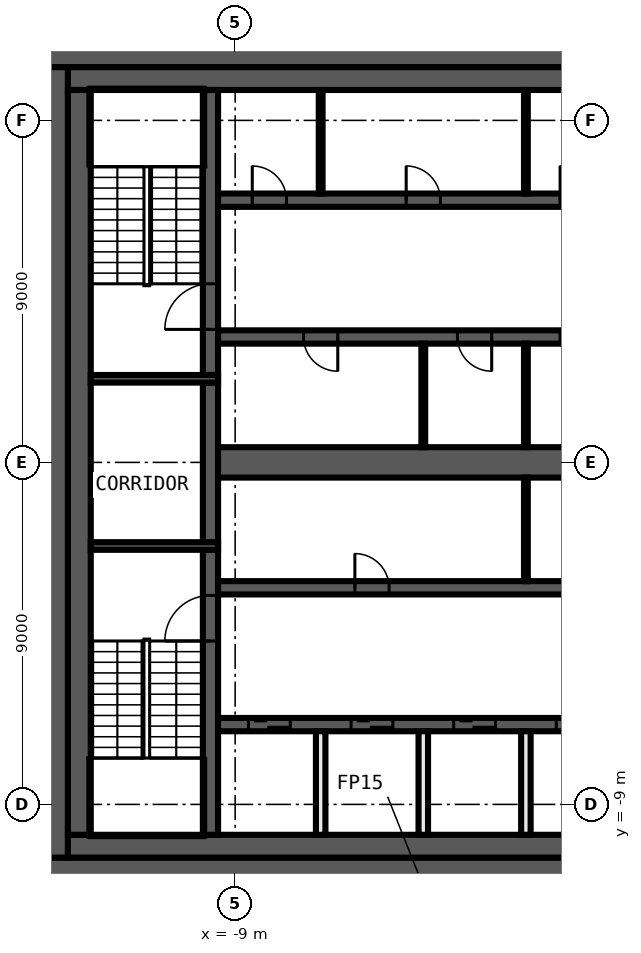
"""IFC4 building model, lengths in metres.
Left out: names, types, materials, properties, quantities, classifications, styles, units other than length and angle.
Written with IfcOpenShell. Run it as: python <this file> out.ifc"""

import sys

from ifc_helpers import new_model, si_unit, direction, frame, frame_2d, origin, place, context, subcontext, project, spatial, rectangle, extrude, element, fill, save


model = new_model("IFC4")
c1 = context("Model", 3, precision=1e-05, world=origin(), true_north=direction((0.0, 1.0)))
c2 = subcontext(c1, "Body", "Model", "MODEL_VIEW")
j1 = project(units=[si_unit("LENGTHUNIT", "METRE"), si_unit("PLANEANGLEUNIT", "RADIAN")], contexts=[c1])
p1 = place(None, origin())
s1 = spatial("IfcSite", under=j1, at=p1, CompositionType="ELEMENT")
p2 = place(p1, origin())
s2 = spatial("IfcBuilding", under=s1, at=p2, CompositionType="ELEMENT")
p3 = place(p2, frame((0.0, 0.0, 306.8)))
s3 = spatial("IfcBuildingStorey", under=s2, at=p3, CompositionType="ELEMENT", Elevation=306.8)
p4 = place(p3, frame((-14.0, 10.7, 0.0), z_axis=(0.0, 0.0, 1.0), x_axis=(1.0, 0.0, 0.0)))
e1 = element("IfcWall", 1, at=p4, inside=s3, PredefinedType="SHEAR", context=c2, shape_type="SweptSolid", body=[
    extrude(rectangle(XDim=28.0, YDim=0.6, at=frame_2d((14.0, 0.0))), origin(), (0.0, 0.0, 1.0), 3.82),
])
p5 = place(p4, frame((15.9, 0.0, 0.0)))
e2 = element("IfcOpeningElement", 2, at=p5, cuts=e1, PredefinedType="OPENING", context=c2, shape_type="SweptSolid", body=[
    extrude(rectangle(XDim=1.6, YDim=2.1, at=frame_2d((0.8, 1.05))), frame((0.0, 0.31, 0.0), z_axis=(0.0, -1.0, 0.0), x_axis=(1.0, 0.0, 0.0)), (0.0, 0.0, 1.0), 0.62),
])
p6 = place(p3, frame((14.0, -10.7, 0.0), z_axis=(0.0, 0.0, 1.0), x_axis=(-1.0, 0.0, 0.0)))
e3 = element("IfcWall", 3, at=p6, inside=s3, PredefinedType="SHEAR", context=c2, shape_type="SweptSolid", body=[
    extrude(rectangle(XDim=28.0, YDim=0.6, at=frame_2d((14.0, 0.0))), origin(), (0.0, 0.0, 1.0), 3.82),
])
p7 = place(p6, frame((5.1, 0.0, 0.0)))
e4 = element("IfcOpeningElement", 4, at=p7, cuts=e3, PredefinedType="OPENING", context=c2, shape_type="SweptSolid", body=[
    extrude(rectangle(XDim=1.6, YDim=2.1, at=frame_2d((0.8, 1.05))), frame((0.0, 0.31, 0.0), z_axis=(0.0, -1.0, 0.0), x_axis=(1.0, 0.0, 0.0)), (0.0, 0.0, 1.0), 0.62),
])
p8 = place(p3, frame((-13.7, -10.4, 0.0), z_axis=(0.0, 0.0, 1.0), x_axis=(0.0, 1.0, 0.0)))
e5 = element("IfcWall", 5, at=p8, inside=s3, PredefinedType="SHEAR", context=c2, shape_type="SweptSolid", body=[
    extrude(rectangle(XDim=20.8, YDim=0.6, at=frame_2d((10.4, 0.0))), origin(), (0.0, 0.0, 1.0), 3.82),
])
p9 = place(p3, frame((-13.4, 10.1, 0.0), z_axis=(0.0, 0.0, 1.0), x_axis=(1.0, 0.0, 0.0)))
e6 = element("IfcWall", 6, at=p9, inside=s3, PredefinedType="SHEAR", context=c2, shape_type="SweptSolid", body=[
    extrude(rectangle(XDim=14.9, YDim=0.6, at=frame_2d((7.45, 0.0))), origin(), (0.0, 0.0, 1.0), 3.82),
])
p10 = place(p3, frame((6.9, -10.1, 0.0), z_axis=(0.0, 0.0, 1.0), x_axis=(-1.0, 0.0, 0.0)))
e7 = element("IfcWall", 7, at=p10, inside=s3, PredefinedType="SHEAR", context=c2, shape_type="SweptSolid", body=[
    extrude(rectangle(XDim=20.3, YDim=0.6, at=frame_2d((10.15, 0.0))), origin(), (0.0, 0.0, 1.0), 3.82),
])
p11 = place(p3, frame((-13.1, -9.8, 0.0), z_axis=(0.0, 0.0, 1.0), x_axis=(0.0, 1.0, 0.0)))
e8 = element("IfcWall", 8, at=p11, inside=s3, PredefinedType="SHEAR", context=c2, shape_type="SweptSolid", body=[
    extrude(rectangle(XDim=19.6, YDim=0.6, at=frame_2d((9.8, 0.0))), origin(), (0.0, 0.0, 1.0), 3.82),
])
p12 = place(p3, frame((-9.65, -9.8, 0.0), z_axis=(0.0, 0.0, 1.0), x_axis=(0.0, 1.0, 0.0)))
e9 = element("IfcWall", 9, at=p12, inside=s3, PredefinedType="SHEAR", context=c2, shape_type="SweptSolid", body=[
    extrude(rectangle(XDim=7.5, YDim=0.4, at=frame_2d((3.75, 0.0))), origin(), (0.0, 0.0, 1.0), 3.82),
])
p13 = place(p12, frame((5.1, 0.0, 0.0)))
e10 = element("IfcOpeningElement", 10, at=p13, cuts=e9, PredefinedType="OPENING", context=c2, shape_type="SweptSolid", body=[
    extrude(rectangle(XDim=1.2, YDim=2.1, at=frame_2d((0.6, 1.05))), frame((0.0, 0.21, 0.0), z_axis=(0.0, -1.0, 0.0), x_axis=(1.0, 0.0, 0.0)), (0.0, 0.0, 1.0), 0.42),
])
p14 = place(p3, frame((-9.65, -2.1, 0.0), z_axis=(0.0, 0.0, 1.0), x_axis=(0.0, 1.0, 0.0)))
e11 = element("IfcWall", 11, at=p14, inside=s3, PredefinedType="SHEAR", context=c2, shape_type="SweptSolid", body=[
    extrude(rectangle(XDim=4.2, YDim=0.4, at=frame_2d((2.1, 0.0))), origin(), (0.0, 0.0, 1.0), 3.82),
])
p15 = place(p3, frame((-9.65, 2.3, 0.0), z_axis=(0.0, 0.0, 1.0), x_axis=(0.0, 1.0, 0.0)))
e12 = element("IfcWall", 12, at=p15, inside=s3, PredefinedType="SHEAR", context=c2, shape_type="SweptSolid", body=[
    extrude(rectangle(XDim=7.5, YDim=0.4, at=frame_2d((3.75, 0.0))), origin(), (0.0, 0.0, 1.0), 3.82),
])
p16 = place(p15, frame((1.2, 0.0, 0.0)))
e13 = element("IfcOpeningElement", 13, at=p16, cuts=e12, PredefinedType="OPENING", context=c2, shape_type="SweptSolid", body=[
    extrude(rectangle(XDim=1.2, YDim=2.1, at=frame_2d((0.6, 1.05))), frame((0.0, 0.21, 0.0), z_axis=(0.0, -1.0, 0.0), x_axis=(1.0, 0.0, 0.0)), (0.0, 0.0, 1.0), 0.42),
])
for number, where, z_axis, x_axis in (
    (14, (-9.45, 2.2, 0.0), (0.0, 0.0, 1.0), (-1.0, 0.0, 0.0)),
    (15, (-9.45, -2.2, 0.0), (0.0, 0.0, 1.0), (-1.0, 0.0, 0.0)),
):
    element("IfcWall", number, at=place(p3, frame(where, z_axis=z_axis, x_axis=x_axis)), inside=s3, PredefinedType="SHEAR", context=c2, shape_type="SweptSolid", body=[
        extrude(rectangle(XDim=3.35, YDim=0.2, at=frame_2d((1.675, 0.0))), origin(), (0.0, 0.0, 1.0), 3.82),
    ])
p17 = place(p3, frame((-9.45, 6.9, 0.0), z_axis=(0.0, 0.0, 1.0), x_axis=(1.0, 0.0, 0.0)))
e16 = element("IfcWall", 16, at=p17, inside=s3, PredefinedType="SHEAR", context=c2, shape_type="SweptSolid", body=[
    extrude(rectangle(XDim=18.9, YDim=0.35, at=frame_2d((9.45, 0.0))), origin(), (0.0, 0.0, 1.0), 3.82),
])
p18 = place(p17, frame((11.55, 0.0, 0.0)))
e17 = element("IfcOpeningElement", 17, at=p18, cuts=e16, PredefinedType="OPENING", context=c2, shape_type="SweptSolid", body=[
    extrude(rectangle(XDim=1.2, YDim=2.1, at=frame_2d((0.6, 1.05))), frame((0.0, 0.185, 0.0), z_axis=(0.0, -1.0, 0.0), x_axis=(1.0, 0.0, 0.0)), (0.0, 0.0, 1.0), 0.37),
])
p19 = place(p17, frame((14.3, 0.0, 0.0)))
e18 = element("IfcOpeningElement", 18, at=p19, cuts=e16, PredefinedType="OPENING", context=c2, shape_type="SweptSolid", body=[
    extrude(rectangle(XDim=1.1, YDim=2.1, at=frame_2d((0.55, 1.05))), frame((0.0, 0.185, 0.0), z_axis=(0.0, -1.0, 0.0), x_axis=(1.0, 0.0, 0.0)), (0.0, 0.0, 1.0), 0.37),
])
p20 = place(p17, frame((17.0, 0.0, 0.0)))
e19 = element("IfcOpeningElement", 19, at=p20, cuts=e16, PredefinedType="OPENING", context=c2, shape_type="SweptSolid", body=[
    extrude(rectangle(XDim=1.1, YDim=2.1, at=frame_2d((0.55, 1.05))), frame((0.0, 0.185, 0.0), z_axis=(0.0, -1.0, 0.0), x_axis=(1.0, 0.0, 0.0)), (0.0, 0.0, 1.0), 0.37),
])
p21 = place(p17, frame((0.9, 0.0, 0.0)))
e20 = element("IfcOpeningElement", 20, at=p21, cuts=e16, PredefinedType="OPENING", context=c2, shape_type="SweptSolid", body=[
    extrude(rectangle(XDim=0.9, YDim=2.1, at=frame_2d((0.45, 1.05))), frame((0.0, 0.185, 0.0), z_axis=(0.0, -1.0, 0.0), x_axis=(1.0, 0.0, 0.0)), (0.0, 0.0, 1.0), 0.37),
])
p22 = place(p17, frame((4.95, 0.0, 0.0)))
e21 = element("IfcOpeningElement", 21, at=p22, cuts=e16, PredefinedType="OPENING", context=c2, shape_type="SweptSolid", body=[
    extrude(rectangle(XDim=0.9, YDim=2.1, at=frame_2d((0.45, 1.05))), frame((0.0, 0.185, 0.0), z_axis=(0.0, -1.0, 0.0), x_axis=(1.0, 0.0, 0.0)), (0.0, 0.0, 1.0), 0.37),
])
p23 = place(p17, frame((9.0, 0.0, 0.0)))
e22 = element("IfcOpeningElement", 22, at=p23, cuts=e16, PredefinedType="OPENING", context=c2, shape_type="SweptSolid", body=[
    extrude(rectangle(XDim=0.9, YDim=2.1, at=frame_2d((0.45, 1.05))), frame((0.0, 0.185, 0.0), z_axis=(0.0, -1.0, 0.0), x_axis=(1.0, 0.0, 0.0)), (0.0, 0.0, 1.0), 0.37),
])
p24 = place(p3, frame((9.45, 3.3, 0.0), z_axis=(0.0, 0.0, 1.0), x_axis=(-1.0, 0.0, 0.0)))
e23 = element("IfcWall", 23, at=p24, inside=s3, PredefinedType="SHEAR", context=c2, shape_type="SweptSolid", body=[
    extrude(rectangle(XDim=18.9, YDim=0.35, at=frame_2d((9.45, 0.0))), origin(), (0.0, 0.0, 1.0), 3.82),
])
p25 = place(p24, frame((6.2, 0.0, 0.0)))
e24 = element("IfcOpeningElement", 24, at=p25, cuts=e23, PredefinedType="OPENING", context=c2, shape_type="SweptSolid", body=[
    extrude(rectangle(XDim=1.1, YDim=2.1, at=frame_2d((0.55, 1.05))), frame((0.0, 0.185, 0.0), z_axis=(0.0, -1.0, 0.0), x_axis=(1.0, 0.0, 0.0)), (0.0, 0.0, 1.0), 0.37),
])
p26 = place(p24, frame((3.5, 0.0, 0.0)))
e25 = element("IfcOpeningElement", 25, at=p26, cuts=e23, PredefinedType="OPENING", context=c2, shape_type="SweptSolid", body=[
    extrude(rectangle(XDim=1.1, YDim=2.1, at=frame_2d((0.55, 1.05))), frame((0.0, 0.185, 0.0), z_axis=(0.0, -1.0, 0.0), x_axis=(1.0, 0.0, 0.0)), (0.0, 0.0, 1.0), 0.37),
])
p27 = place(p24, frame((0.9, 0.0, 0.0)))
e26 = element("IfcOpeningElement", 26, at=p27, cuts=e23, PredefinedType="OPENING", context=c2, shape_type="SweptSolid", body=[
    extrude(rectangle(XDim=0.9, YDim=2.1, at=frame_2d((0.45, 1.05))), frame((0.0, 0.185, 0.0), z_axis=(0.0, -1.0, 0.0), x_axis=(1.0, 0.0, 0.0)), (0.0, 0.0, 1.0), 0.37),
])
p28 = place(p24, frame((15.75, 0.0, 0.0)))
e27 = element("IfcOpeningElement", 27, at=p28, cuts=e23, PredefinedType="OPENING", context=c2, shape_type="SweptSolid", body=[
    extrude(rectangle(XDim=0.9, YDim=2.1, at=frame_2d((0.45, 1.05))), frame((0.0, 0.185, 0.0), z_axis=(0.0, -1.0, 0.0), x_axis=(1.0, 0.0, 0.0)), (0.0, 0.0, 1.0), 0.37),
])
p29 = place(p24, frame((11.7, 0.0, 0.0)))
e28 = element("IfcOpeningElement", 28, at=p29, cuts=e23, PredefinedType="OPENING", context=c2, shape_type="SweptSolid", body=[
    extrude(rectangle(XDim=0.9, YDim=2.1, at=frame_2d((0.45, 1.05))), frame((0.0, 0.185, 0.0), z_axis=(0.0, -1.0, 0.0), x_axis=(1.0, 0.0, 0.0)), (0.0, 0.0, 1.0), 0.37),
])
p30 = place(p24, frame((9.0, 0.0, 0.0)))
e29 = element("IfcOpeningElement", 29, at=p30, cuts=e23, PredefinedType="OPENING", context=c2, shape_type="SweptSolid", body=[
    extrude(rectangle(XDim=0.9, YDim=2.1, at=frame_2d((0.45, 1.05))), frame((0.0, 0.185, 0.0), z_axis=(0.0, -1.0, 0.0), x_axis=(1.0, 0.0, 0.0)), (0.0, 0.0, 1.0), 0.37),
])
p31 = place(p3, frame((-9.45, -3.3, 0.0), z_axis=(0.0, 0.0, 1.0), x_axis=(1.0, 0.0, 0.0)))
e30 = element("IfcWall", 30, at=p31, inside=s3, PredefinedType="SHEAR", context=c2, shape_type="SweptSolid", body=[
    extrude(rectangle(XDim=18.9, YDim=0.35, at=frame_2d((9.45, 0.0))), origin(), (0.0, 0.0, 1.0), 3.82),
])
p32 = place(p31, frame((17.0, 0.0, 0.0)))
e31 = element("IfcOpeningElement", 31, at=p32, cuts=e30, PredefinedType="OPENING", context=c2, shape_type="SweptSolid", body=[
    extrude(rectangle(XDim=1.1, YDim=2.1, at=frame_2d((0.55, 1.05))), frame((0.0, 0.185, 0.0), z_axis=(0.0, -1.0, 0.0), x_axis=(1.0, 0.0, 0.0)), (0.0, 0.0, 1.0), 0.37),
])
p33 = place(p31, frame((3.6, 0.0, 0.0)))
e32 = element("IfcOpeningElement", 32, at=p33, cuts=e30, PredefinedType="OPENING", context=c2, shape_type="SweptSolid", body=[
    extrude(rectangle(XDim=0.9, YDim=2.1, at=frame_2d((0.45, 1.05))), frame((0.0, 0.185, 0.0), z_axis=(0.0, -1.0, 0.0), x_axis=(1.0, 0.0, 0.0)), (0.0, 0.0, 1.0), 0.37),
])
p34 = place(p31, frame((10.35, 0.0, 0.0)))
e33 = element("IfcOpeningElement", 33, at=p34, cuts=e30, PredefinedType="OPENING", context=c2, shape_type="SweptSolid", body=[
    extrude(rectangle(XDim=0.9, YDim=2.1, at=frame_2d((0.45, 1.05))), frame((0.0, 0.185, 0.0), z_axis=(0.0, -1.0, 0.0), x_axis=(1.0, 0.0, 0.0)), (0.0, 0.0, 1.0), 0.37),
])
p35 = place(p31, frame((14.4, 0.0, 0.0)))
e34 = element("IfcOpeningElement", 34, at=p35, cuts=e30, PredefinedType="OPENING", context=c2, shape_type="SweptSolid", body=[
    extrude(rectangle(XDim=0.9, YDim=2.1, at=frame_2d((0.45, 1.05))), frame((0.0, 0.185, 0.0), z_axis=(0.0, -1.0, 0.0), x_axis=(1.0, 0.0, 0.0)), (0.0, 0.0, 1.0), 0.37),
])
p36 = place(p3, frame((9.45, -6.9, 0.0), z_axis=(0.0, 0.0, 1.0), x_axis=(-1.0, 0.0, 0.0)))
e35 = element("IfcWall", 35, at=p36, inside=s3, PredefinedType="SHEAR", context=c2, shape_type="SweptSolid", body=[
    extrude(rectangle(XDim=18.9, YDim=0.35, at=frame_2d((9.45, 0.0))), origin(), (0.0, 0.0, 1.0), 3.82),
])
p37 = place(p36, frame((17.0, 0.0, 0.0)))
e36 = element("IfcOpeningElement", 36, at=p37, cuts=e35, PredefinedType="OPENING", context=c2, shape_type="SweptSolid", body=[
    extrude(rectangle(XDim=1.1, YDim=2.1, at=frame_2d((0.55, 1.05))), frame((0.0, 0.185, 0.0), z_axis=(0.0, -1.0, 0.0), x_axis=(1.0, 0.0, 0.0)), (0.0, 0.0, 1.0), 0.37),
])
p38 = place(p36, frame((14.3, 0.0, 0.0)))
e37 = element("IfcOpeningElement", 37, at=p38, cuts=e35, PredefinedType="OPENING", context=c2, shape_type="SweptSolid", body=[
    extrude(rectangle(XDim=1.1, YDim=2.1, at=frame_2d((0.55, 1.05))), frame((0.0, 0.185, 0.0), z_axis=(0.0, -1.0, 0.0), x_axis=(1.0, 0.0, 0.0)), (0.0, 0.0, 1.0), 0.37),
])
p39 = place(p36, frame((11.6, 0.0, 0.0)))
e38 = element("IfcOpeningElement", 38, at=p39, cuts=e35, PredefinedType="OPENING", context=c2, shape_type="SweptSolid", body=[
    extrude(rectangle(XDim=1.1, YDim=2.1, at=frame_2d((0.55, 1.05))), frame((0.0, 0.185, 0.0), z_axis=(0.0, -1.0, 0.0), x_axis=(1.0, 0.0, 0.0)), (0.0, 0.0, 1.0), 0.37),
])
p40 = place(p36, frame((8.9, 0.0, 0.0)))
e39 = element("IfcOpeningElement", 39, at=p40, cuts=e35, PredefinedType="OPENING", context=c2, shape_type="SweptSolid", body=[
    extrude(rectangle(XDim=1.1, YDim=2.1, at=frame_2d((0.55, 1.05))), frame((0.0, 0.185, 0.0), z_axis=(0.0, -1.0, 0.0), x_axis=(1.0, 0.0, 0.0)), (0.0, 0.0, 1.0), 0.37),
])
p41 = place(p36, frame((0.75, 0.0, 0.0)))
e40 = element("IfcOpeningElement", 40, at=p41, cuts=e35, PredefinedType="OPENING", context=c2, shape_type="SweptSolid", body=[
    extrude(rectangle(XDim=1.2, YDim=2.1, at=frame_2d((0.6, 1.05))), frame((0.0, 0.185, 0.0), z_axis=(0.0, -1.0, 0.0), x_axis=(1.0, 0.0, 0.0)), (0.0, 0.0, 1.0), 0.37),
])
p42 = place(p36, frame((4.95, 0.0, 0.0)))
e41 = element("IfcOpeningElement", 41, at=p42, cuts=e35, PredefinedType="OPENING", context=c2, shape_type="SweptSolid", body=[
    extrude(rectangle(XDim=0.9, YDim=2.1, at=frame_2d((0.45, 1.05))), frame((0.0, 0.185, 0.0), z_axis=(0.0, -1.0, 0.0), x_axis=(1.0, 0.0, 0.0)), (0.0, 0.0, 1.0), 0.37),
])
p43 = place(p3, frame((-9.45, 0.0, 0.0), z_axis=(0.0, 0.0, 1.0), x_axis=(1.0, 0.0, 0.0)))
e42 = element("IfcWall", 42, at=p43, inside=s3, PredefinedType="SHEAR", context=c2, shape_type="SweptSolid", body=[
    extrude(rectangle(XDim=18.9, YDim=0.8, at=frame_2d((9.45, 0.0))), origin(), (0.0, 0.0, 1.0), 3.82),
])
for number, where, z_axis, x_axis in (
    (43, (-1.35, -3.125, 0.0), (0.0, 0.0, 1.0), (0.0, 1.0, 0.0)),
    (44, (-1.35, 0.4, 0.0), (0.0, 0.0, 1.0), (0.0, 1.0, 0.0)),
    (45, (-1.35, 7.075, 0.0), (0.0, 0.0, 1.0), (0.0, 1.0, 0.0)),
):
    element("IfcWall", number, at=place(p3, frame(where, z_axis=z_axis, x_axis=x_axis)), inside=s3, PredefinedType="PARTITIONING", context=c2, shape_type="SweptSolid", body=[
        extrude(rectangle(XDim=2.725, YDim=0.1, at=frame_2d((1.363, 0.0))), origin(), (0.0, 0.0, 1.0), 3.82),
    ])
p44 = place(p3, frame((-1.35, -9.8, 0.0), z_axis=(0.0, 0.0, 1.0), x_axis=(0.0, 1.0, 0.0)))
e46 = element("IfcWall", 46, at=p44, inside=s3, PredefinedType="SOLIDWALL", context=c2, shape_type="SweptSolid", body=[
    extrude(rectangle(XDim=2.725, YDim=0.25, at=frame_2d((1.363, 0.0))), origin(), (0.0, 0.0, 1.0), 3.82),
])
p45 = place(p3, frame((-4.05, 0.4, 0.0), z_axis=(0.0, 0.0, 1.0), x_axis=(0.0, 1.0, 0.0)))
e47 = element("IfcWall", 47, at=p45, inside=s3, PredefinedType="PARTITIONING", context=c2, shape_type="SweptSolid", body=[
    extrude(rectangle(XDim=2.725, YDim=0.1, at=frame_2d((1.363, 0.0))), origin(), (0.0, 0.0, 1.0), 3.82),
])
p46 = place(p3, frame((-4.05, -9.8, 0.0), z_axis=(0.0, 0.0, 1.0), x_axis=(0.0, 1.0, 0.0)))
e48 = element("IfcWall", 48, at=p46, inside=s3, PredefinedType="SOLIDWALL", context=c2, shape_type="SweptSolid", body=[
    extrude(rectangle(XDim=2.725, YDim=0.25, at=frame_2d((1.363, 0.0))), origin(), (0.0, 0.0, 1.0), 3.82),
])
p47 = place(p3, frame((-6.75, 7.075, 0.0), z_axis=(0.0, 0.0, 1.0), x_axis=(0.0, 1.0, 0.0)))
e49 = element("IfcWall", 49, at=p47, inside=s3, PredefinedType="PARTITIONING", context=c2, shape_type="SweptSolid", body=[
    extrude(rectangle(XDim=2.725, YDim=0.1, at=frame_2d((1.363, 0.0))), origin(), (0.0, 0.0, 1.0), 3.82),
])
p48 = place(p3, frame((-6.75, -9.8, 0.0), z_axis=(0.0, 0.0, 1.0), x_axis=(0.0, 1.0, 0.0)))
e50 = element("IfcWall", 50, at=p48, inside=s3, PredefinedType="SOLIDWALL", context=c2, shape_type="SweptSolid", body=[
    extrude(rectangle(XDim=2.725, YDim=0.25, at=frame_2d((1.363, 0.0))), origin(), (0.0, 0.0, 1.0), 3.82),
])
p49 = place(p37, origin())
e51 = element("IfcDoor", 51, at=p49, inside=s3, OperationType="DOUBLE_DOOR_SLIDING", PredefinedType="DOOR", context=c2, shape_type="SweptSolid", body=[
    extrude(rectangle(XDim=1.1, YDim=2.1, at=frame_2d((0.55, 1.05))), frame((0.0, 0.025, 0.0), z_axis=(0.0, -1.0, 0.0), x_axis=(1.0, 0.0, 0.0)), (0.0, 0.0, 1.0), 0.05),
])
fill(e36, e51)
p50 = place(p38, origin())
e52 = element("IfcDoor", 52, at=p50, inside=s3, OperationType="DOUBLE_DOOR_SLIDING", PredefinedType="DOOR", context=c2, shape_type="SweptSolid", body=[
    extrude(rectangle(XDim=1.1, YDim=2.1, at=frame_2d((0.55, 1.05))), frame((0.0, 0.025, 0.0), z_axis=(0.0, -1.0, 0.0), x_axis=(1.0, 0.0, 0.0)), (0.0, 0.0, 1.0), 0.05),
])
fill(e37, e52)
p51 = place(p39, origin())
e53 = element("IfcDoor", 53, at=p51, inside=s3, OperationType="DOUBLE_DOOR_SLIDING", PredefinedType="DOOR", context=c2, shape_type="SweptSolid", body=[
    extrude(rectangle(XDim=1.1, YDim=2.1, at=frame_2d((0.55, 1.05))), frame((0.0, 0.025, 0.0), z_axis=(0.0, -1.0, 0.0), x_axis=(1.0, 0.0, 0.0)), (0.0, 0.0, 1.0), 0.05),
])
fill(e38, e53)
p52 = place(p40, origin())
e54 = element("IfcDoor", 54, at=p52, inside=s3, OperationType="DOUBLE_DOOR_SLIDING", PredefinedType="DOOR", context=c2, shape_type="SweptSolid", body=[
    extrude(rectangle(XDim=1.1, YDim=2.1, at=frame_2d((0.55, 1.05))), frame((0.0, 0.025, 0.0), z_axis=(0.0, -1.0, 0.0), x_axis=(1.0, 0.0, 0.0)), (0.0, 0.0, 1.0), 0.05),
])
fill(e39, e54)
p53 = place(p21, origin())
e55 = element("IfcDoor", 55, at=p53, inside=s3, OperationType="SINGLE_SWING_RIGHT", PredefinedType="DOOR", context=c2, shape_type="SweptSolid", body=[
    extrude(rectangle(XDim=0.9, YDim=2.1, at=frame_2d((0.45, 1.05))), frame((0.0, 0.025, 0.0), z_axis=(0.0, -1.0, 0.0), x_axis=(1.0, 0.0, 0.0)), (0.0, 0.0, 1.0), 0.05),
])
fill(e20, e55)
p54 = place(p22, origin())
e56 = element("IfcDoor", 56, at=p54, inside=s3, OperationType="SINGLE_SWING_LEFT", PredefinedType="DOOR", context=c2, shape_type="SweptSolid", body=[
    extrude(rectangle(XDim=0.9, YDim=2.1, at=frame_2d((0.45, 1.05))), frame((0.0, 0.025, 0.0), z_axis=(0.0, -1.0, 0.0), x_axis=(1.0, 0.0, 0.0)), (0.0, 0.0, 1.0), 0.05),
])
fill(e21, e56)
p55 = place(p23, origin())
e57 = element("IfcDoor", 57, at=p55, inside=s3, OperationType="SINGLE_SWING_RIGHT", PredefinedType="DOOR", context=c2, shape_type="SweptSolid", body=[
    extrude(rectangle(XDim=0.9, YDim=2.1, at=frame_2d((0.45, 1.05))), frame((0.0, 0.025, 0.0), z_axis=(0.0, -1.0, 0.0), x_axis=(1.0, 0.0, 0.0)), (0.0, 0.0, 1.0), 0.05),
])
fill(e22, e57)
p56 = place(p28, origin())
e58 = element("IfcDoor", 58, at=p56, inside=s3, OperationType="SINGLE_SWING_LEFT", PredefinedType="DOOR", context=c2, shape_type="SweptSolid", body=[
    extrude(rectangle(XDim=0.9, YDim=2.1, at=frame_2d((0.45, 1.05))), frame((0.0, 0.025, 0.0), z_axis=(0.0, -1.0, 0.0), x_axis=(1.0, 0.0, 0.0)), (0.0, 0.0, 1.0), 0.05),
])
fill(e27, e58)
p57 = place(p29, origin())
e59 = element("IfcDoor", 59, at=p57, inside=s3, OperationType="SINGLE_SWING_RIGHT", PredefinedType="DOOR", context=c2, shape_type="SweptSolid", body=[
    extrude(rectangle(XDim=0.9, YDim=2.1, at=frame_2d((0.45, 1.05))), frame((0.0, 0.025, 0.0), z_axis=(0.0, -1.0, 0.0), x_axis=(1.0, 0.0, 0.0)), (0.0, 0.0, 1.0), 0.05),
])
fill(e28, e59)
p58 = place(p30, origin())
e60 = element("IfcDoor", 60, at=p58, inside=s3, OperationType="SINGLE_SWING_LEFT", PredefinedType="DOOR", context=c2, shape_type="SweptSolid", body=[
    extrude(rectangle(XDim=0.9, YDim=2.1, at=frame_2d((0.45, 1.05))), frame((0.0, 0.025, 0.0), z_axis=(0.0, -1.0, 0.0), x_axis=(1.0, 0.0, 0.0)), (0.0, 0.0, 1.0), 0.05),
])
fill(e29, e60)
p59 = place(p33, origin())
e61 = element("IfcDoor", 61, at=p59, inside=s3, OperationType="SINGLE_SWING_RIGHT", PredefinedType="DOOR", context=c2, shape_type="SweptSolid", body=[
    extrude(rectangle(XDim=0.9, YDim=2.1, at=frame_2d((0.45, 1.05))), frame((0.0, 0.025, 0.0), z_axis=(0.0, -1.0, 0.0), x_axis=(1.0, 0.0, 0.0)), (0.0, 0.0, 1.0), 0.05),
])
fill(e32, e61)
p60 = place(p16, origin())
e62 = element("IfcDoor", 62, at=p60, inside=s3, OperationType="SINGLE_SWING_RIGHT", PredefinedType="DOOR", context=c2, shape_type="SweptSolid", body=[
    extrude(rectangle(XDim=1.2, YDim=2.1, at=frame_2d((0.6, 1.05))), frame((0.0, 0.025, 0.0), z_axis=(0.0, -1.0, 0.0), x_axis=(1.0, 0.0, 0.0)), (0.0, 0.0, 1.0), 0.05),
])
fill(e13, e62)
p61 = place(p13, origin())
e63 = element("IfcDoor", 63, at=p61, inside=s3, OperationType="SINGLE_SWING_LEFT", PredefinedType="DOOR", context=c2, shape_type="SweptSolid", body=[
    extrude(rectangle(XDim=1.2, YDim=2.1, at=frame_2d((0.6, 1.05))), frame((0.0, 0.025, 0.0), z_axis=(0.0, -1.0, 0.0), x_axis=(1.0, 0.0, 0.0)), (0.0, 0.0, 1.0), 0.05),
])
fill(e10, e63)
save(model, sys.argv[1])
